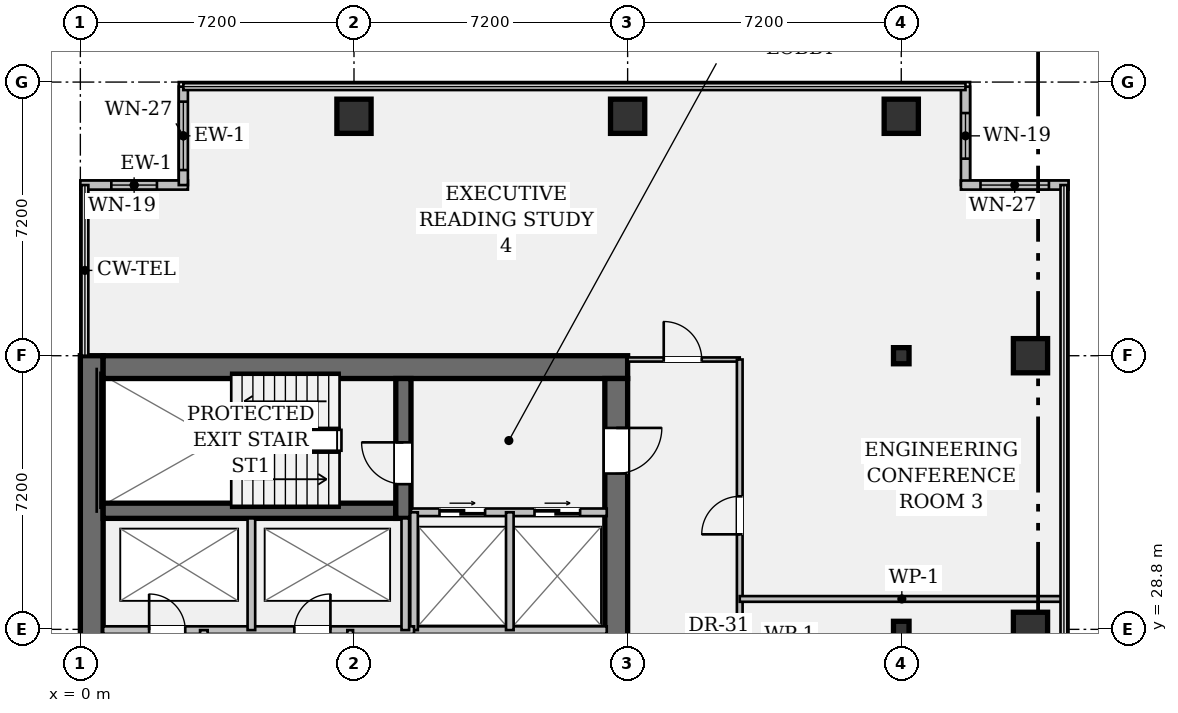
"""IFC4 building model, lengths in metres.
Left out: names, types, materials, properties, quantities, classifications, styles, units other than length and angle.
Written with IfcOpenShell. Run it as: python <this file> out.ifc"""

import sys

from ifc_helpers import new_model, si_unit, direction, frame, frame_2d, origin, origin_2d, place, context, subcontext, project, spatial, rectangle, hollow_rectangle, i_section, extrude, element, fill, save


model = new_model("IFC4")
c1 = context("Model", 3, precision=1e-05, world=origin(), true_north=direction((0.0, 1.0)))
c2 = subcontext(c1, "Body", "Model", "MODEL_VIEW")
j1 = project(units=[si_unit("LENGTHUNIT", "METRE"), si_unit("PLANEANGLEUNIT", "RADIAN")], contexts=[c1])
p1 = place(None, origin())
s1 = spatial("IfcSite", under=j1, at=p1, CompositionType="ELEMENT")
p2 = place(p1, origin())
s2 = spatial("IfcBuilding", under=s1, at=p2, CompositionType="ELEMENT")
p3 = place(p2, frame((0.0, 0.0, 144.55)))
s3 = spatial("IfcBuildingStorey", under=s2, at=p3, CompositionType="ELEMENT", Elevation=144.55)
p4 = place(p3, frame((0.3, 7.2, 0.0), z_axis=(0.0, 0.0, 1.0), x_axis=(0.0, 1.0, 0.0)))
e1 = element("IfcWall", 1, at=p4, inside=s3, PredefinedType="SHEAR", context=c2, shape_type="SweptSolid", body=[
    extrude(rectangle(XDim=28.8, YDim=0.6, at=frame_2d((14.4, 0.0))), origin(), (0.0, 0.0, 1.0), 3.58),
])
p5 = place(p3, frame((0.6, 35.7, 0.0), z_axis=(0.0, 0.0, 1.0), x_axis=(1.0, 0.0, 0.0)))
e2 = element("IfcWall", 2, at=p5, inside=s3, PredefinedType="SHEAR", context=c2, shape_type="SweptSolid", body=[
    extrude(rectangle(XDim=13.8, YDim=0.6, at=frame_2d((6.9, 0.0))), origin(), (0.0, 0.0, 1.0), 3.58),
])
p6 = place(p3, frame((14.1, 35.4, 0.0), z_axis=(0.0, 0.0, 1.0), x_axis=(0.0, -1.0, 0.0)))
e3 = element("IfcWall", 3, at=p6, inside=s3, PredefinedType="SHEAR", context=c2, shape_type="SweptSolid", body=[
    extrude(rectangle(XDim=27.6, YDim=0.6, at=frame_2d((13.8, 0.0))), origin(), (0.0, 0.0, 1.0), 3.58),
])
p7 = place(p6, frame((1.3, 0.0, 0.0)))
e4 = element("IfcOpeningElement", 4, at=p7, cuts=e3, PredefinedType="OPENING", context=c2, shape_type="SweptSolid", body=[
    extrude(rectangle(XDim=1.2, YDim=2.15, at=frame_2d((0.6, 1.075))), frame((0.0, 0.312, 0.0), z_axis=(0.0, -1.0, 0.0), x_axis=(1.0, 0.0, 0.0)), (0.0, 0.0, 1.0), 0.624),
])
p8 = place(p6, frame((25.25, 0.0, 0.0)))
e5 = element("IfcOpeningElement", 5, at=p8, cuts=e3, PredefinedType="OPENING", context=c2, shape_type="SweptSolid", body=[
    extrude(rectangle(XDim=1.2, YDim=2.15, at=frame_2d((0.6, 1.075))), frame((0.0, 0.312, 0.0), z_axis=(0.0, -1.0, 0.0), x_axis=(1.0, 0.0, 0.0)), (0.0, 0.0, 1.0), 0.624),
])
p9 = place(p6, frame((14.6, 0.0, 0.0)))
e6 = element("IfcOpeningElement", 6, at=p9, cuts=e3, PredefinedType="OPENING", context=c2, shape_type="SweptSolid", body=[
    extrude(rectangle(XDim=1.6, YDim=2.2, at=frame_2d((0.8, 1.1))), frame((0.0, 0.312, 0.0), z_axis=(0.0, -1.0, 0.0), x_axis=(1.0, 0.0, 0.0)), (0.0, 0.0, 1.0), 0.624),
])
p10 = place(p3, frame((0.6, 31.92, 0.0), z_axis=(0.0, 0.0, 1.0), x_axis=(1.0, 0.0, 0.0)))
e7 = element("IfcWall", 7, at=p10, inside=s3, PredefinedType="SHEAR", context=c2, shape_type="SweptSolid", body=[
    extrude(rectangle(XDim=7.7, YDim=0.4, at=frame_2d((3.85, 0.0))), origin(), (0.0, 0.0, 1.0), 3.58),
])
p11 = place(p3, frame((8.5, 31.72, 0.0), z_axis=(0.0, 0.0, 1.0), x_axis=(0.0, 1.0, 0.0)))
e8 = element("IfcWall", 8, at=p11, inside=s3, PredefinedType="SHEAR", context=c2, shape_type="SweptSolid", body=[
    extrude(rectangle(XDim=3.68, YDim=0.4, at=frame_2d((1.84, 0.0))), origin(), (0.0, 0.0, 1.0), 3.58),
])
p12 = place(p11, frame((0.9, 0.0, 0.0)))
e9 = element("IfcOpeningElement", 9, at=p12, cuts=e8, PredefinedType="OPENING", context=c2, shape_type="SweptSolid", body=[
    extrude(rectangle(XDim=1.1, YDim=2.15, at=frame_2d((0.55, 1.075))), frame((0.0, 0.212, 0.0), z_axis=(0.0, -1.0, 0.0), x_axis=(1.0, 0.0, 0.0)), (0.0, 0.0, 1.0), 0.424),
])
for number, where, z_axis, x_axis in (
    (10, (7.2, 42.3, 0.0), (0.0, 0.0, 1.0), (1.0, 0.0, 0.0)),
    (11, (14.4, 42.3, 0.0), (0.0, 0.0, 1.0), (1.0, 0.0, 0.0)),
):
    element("IfcColumn", number, at=place(p3, frame(where, z_axis=z_axis, x_axis=x_axis)), inside=s3, PredefinedType="COLUMN", context=c2, shape_type="SweptSolid", body=[
        extrude(hollow_rectangle(XDim=0.9, YDim=0.9, WallThickness=0.055, at=origin_2d()), origin(), (0.0, 0.0, 1.0), 3.58),
    ])
for number, where, z_axis, x_axis in (
    (12, (21.6, 28.8, 0.0), (0.0, 0.0, 1.0), (1.0, 0.0, 0.0)),
    (13, (21.6, 36.0, 0.0), (0.0, 0.0, 1.0), (1.0, 0.0, 0.0)),
):
    element("IfcColumn", number, at=place(p3, frame(where, z_axis=z_axis, x_axis=x_axis)), inside=s3, PredefinedType="COLUMN", context=c2, shape_type="SweptSolid", body=[
        extrude(i_section(OverallWidth=0.409, OverallDepth=0.424, WebThickness=0.033, FlangeThickness=0.052, FilletRadius=0.018, at=origin_2d()), origin(), (0.0, 0.0, 1.0), 3.58),
    ])
for number, where, z_axis, x_axis in (
    (14, (21.6, 42.3, 0.0), (0.0, 0.0, 1.0), (1.0, 0.0, 0.0)),
    (15, (25.0, 28.8, 0.0), (0.0, 0.0, 1.0), (1.0, 0.0, 0.0)),
    (16, (25.0, 36.0, 0.0), (0.0, 0.0, 1.0), (1.0, 0.0, 0.0)),
):
    element("IfcColumn", number, at=place(p3, frame(where, z_axis=z_axis, x_axis=x_axis)), inside=s3, PredefinedType="COLUMN", context=c2, shape_type="SweptSolid", body=[
        extrude(hollow_rectangle(XDim=0.9, YDim=0.9, WallThickness=0.055, at=origin_2d()), origin(), (0.0, 0.0, 1.0), 3.58),
    ])
p13 = place(p3, frame((0.0, 40.49, 0.0), z_axis=(0.0, 0.0, 1.0), x_axis=(1.0, 0.0, 0.0)))
e17 = element("IfcWall", 17, at=p13, inside=s3, PredefinedType="STANDARD", context=c2, shape_type="SweptSolid", body=[
    extrude(rectangle(XDim=2.83, YDim=0.24, at=frame_2d((1.415, 0.0))), origin(), (0.0, 0.0, 1.0), 3.58),
])
p14 = place(p13, frame((0.815, 0.0, 0.95)))
e18 = element("IfcOpeningElement", 18, at=p14, cuts=e17, PredefinedType="OPENING", context=c2, shape_type="SweptSolid", body=[
    extrude(rectangle(XDim=1.2, YDim=1.8, at=frame_2d((0.6, 0.9))), frame((0.0, 0.132, 0.0), z_axis=(0.0, -1.0, 0.0), x_axis=(1.0, 0.0, 0.0)), (0.0, 0.0, 1.0), 0.264),
])
p15 = place(p3, frame((2.71, 40.49, 0.0), z_axis=(0.0, 0.0, 1.0), x_axis=(0.0, 1.0, 0.0)))
e19 = element("IfcWall", 19, at=p15, inside=s3, PredefinedType="STANDARD", context=c2, shape_type="SweptSolid", body=[
    extrude(rectangle(XDim=2.59, YDim=0.24, at=frame_2d((1.295, 0.0))), origin(), (0.0, 0.0, 1.0), 3.58),
])
p16 = place(p15, frame((0.395, 0.0, 0.95)))
e20 = element("IfcOpeningElement", 20, at=p16, cuts=e19, PredefinedType="OPENING", context=c2, shape_type="SweptSolid", body=[
    extrude(rectangle(XDim=1.8, YDim=1.35, at=frame_2d((0.9, 0.675))), frame((0.0, 0.132, 0.0), z_axis=(0.0, -1.0, 0.0), x_axis=(1.0, 0.0, 0.0)), (0.0, 0.0, 1.0), 0.264),
])
p17 = place(p3, frame((23.29, 43.08, 0.0), z_axis=(0.0, 0.0, 1.0), x_axis=(0.0, -1.0, 0.0)))
e21 = element("IfcWall", 21, at=p17, inside=s3, PredefinedType="STANDARD", context=c2, shape_type="SweptSolid", body=[
    extrude(rectangle(XDim=2.59, YDim=0.24, at=frame_2d((1.295, 0.0))), origin(), (0.0, 0.0, 1.0), 3.58),
])
p18 = place(p17, frame((0.695, 0.0, 0.95)))
e22 = element("IfcOpeningElement", 22, at=p18, cuts=e21, PredefinedType="OPENING", context=c2, shape_type="SweptSolid", body=[
    extrude(rectangle(XDim=1.2, YDim=1.8, at=frame_2d((0.6, 0.9))), frame((0.0, 0.132, 0.0), z_axis=(0.0, -1.0, 0.0), x_axis=(1.0, 0.0, 0.0)), (0.0, 0.0, 1.0), 0.264),
])
p19 = place(p3, frame((23.17, 40.49, 0.0), z_axis=(0.0, 0.0, 1.0), x_axis=(1.0, 0.0, 0.0)))
e23 = element("IfcWall", 23, at=p19, inside=s3, PredefinedType="STANDARD", context=c2, shape_type="SweptSolid", body=[
    extrude(rectangle(XDim=2.83, YDim=0.24, at=frame_2d((1.415, 0.0))), origin(), (0.0, 0.0, 1.0), 3.58),
])
p20 = place(p19, frame((0.515, 0.0, 0.95)))
e24 = element("IfcOpeningElement", 24, at=p20, cuts=e23, PredefinedType="OPENING", context=c2, shape_type="SweptSolid", body=[
    extrude(rectangle(XDim=1.8, YDim=1.35, at=frame_2d((0.9, 0.675))), frame((0.0, 0.132, 0.0), z_axis=(0.0, -1.0, 0.0), x_axis=(1.0, 0.0, 0.0)), (0.0, 0.0, 1.0), 0.264),
])
p21 = place(p3, frame((8.7, 31.88, 0.0), z_axis=(0.0, 0.0, 1.0), x_axis=(1.0, 0.0, 0.0)))
e25 = element("IfcWall", 25, at=p21, inside=s3, PredefinedType="PARTITIONING", context=c2, shape_type="SweptSolid", body=[
    extrude(rectangle(XDim=5.15, YDim=0.2, at=frame_2d((2.575, 0.0))), origin(), (0.0, 0.0, 1.0), 3.58),
])
p22 = place(p21, frame((0.75, 0.0, 0.0)))
e26 = element("IfcOpeningElement", 26, at=p22, cuts=e25, PredefinedType="OPENING", context=c2, shape_type="SweptSolid", body=[
    extrude(rectangle(XDim=1.2, YDim=2.2, at=frame_2d((0.6, 1.1))), frame((0.0, 0.112, 0.0), z_axis=(0.0, -1.0, 0.0), x_axis=(1.0, 0.0, 0.0)), (0.0, 0.0, 1.0), 0.224),
])
p23 = place(p21, frame((3.25, 0.0, 0.0)))
e27 = element("IfcOpeningElement", 27, at=p23, cuts=e25, PredefinedType="OPENING", context=c2, shape_type="SweptSolid", body=[
    extrude(rectangle(XDim=1.2, YDim=2.2, at=frame_2d((0.6, 1.1))), frame((0.0, 0.112, 0.0), z_axis=(0.0, -1.0, 0.0), x_axis=(1.0, 0.0, 0.0)), (0.0, 0.0, 1.0), 0.224),
])
p24 = place(p3, frame((8.7, 28.78, 0.0), z_axis=(0.0, 0.0, 1.0), x_axis=(1.0, 0.0, 0.0)))
e28 = element("IfcWall", 28, at=p24, inside=s3, PredefinedType="PARTITIONING", context=c2, shape_type="SweptSolid", body=[
    extrude(rectangle(XDim=5.15, YDim=0.2, at=frame_2d((2.575, 0.0))), origin(), (0.0, 0.0, 1.0), 3.58),
])
for number, where, z_axis, x_axis in (
    (29, (8.78, 28.78, 0.0), (0.0, 0.0, 1.0), (0.0, 1.0, 0.0)),
    (30, (11.3, 28.78, 0.0), (0.0, 0.0, 1.0), (0.0, 1.0, 0.0)),
):
    element("IfcWall", number, at=place(p3, frame(where, z_axis=z_axis, x_axis=x_axis)), inside=s3, PredefinedType="PARTITIONING", context=c2, shape_type="SweptSolid", body=[
        extrude(rectangle(XDim=3.1, YDim=0.2, at=frame_2d((1.55, 0.0))), origin(), (0.0, 0.0, 1.0), 3.58),
    ])
p25 = place(p3, frame((0.6, 28.78, 0.0), z_axis=(0.0, 0.0, 1.0), x_axis=(1.0, 0.0, 0.0)))
e31 = element("IfcWall", 31, at=p25, inside=s3, PredefinedType="PARTITIONING", context=c2, shape_type="SweptSolid", body=[
    extrude(rectangle(XDim=8.18, YDim=0.2, at=frame_2d((4.09, 0.0))), origin(), (0.0, 0.0, 1.0), 3.58),
])
p26 = place(p25, frame((1.21, 0.0, 0.0)))
e32 = element("IfcOpeningElement", 32, at=p26, cuts=e31, PredefinedType="OPENING", context=c2, shape_type="SweptSolid", body=[
    extrude(rectangle(XDim=0.95, YDim=2.15, at=frame_2d((0.475, 1.075))), frame((0.0, 0.112, 0.0), z_axis=(0.0, -1.0, 0.0), x_axis=(1.0, 0.0, 0.0)), (0.0, 0.0, 1.0), 0.224),
])
p27 = place(p25, frame((5.03, 0.0, 0.0)))
e33 = element("IfcOpeningElement", 33, at=p27, cuts=e31, PredefinedType="OPENING", context=c2, shape_type="SweptSolid", body=[
    extrude(rectangle(XDim=0.95, YDim=2.15, at=frame_2d((0.475, 1.075))), frame((0.0, 0.112, 0.0), z_axis=(0.0, -1.0, 0.0), x_axis=(1.0, 0.0, 0.0)), (0.0, 0.0, 1.0), 0.224),
])
for number, where, z_axis, x_axis in (
    (34, (4.5, 28.78, 0.0), (0.0, 0.0, 1.0), (0.0, 1.0, 0.0)),
    (35, (8.55, 28.78, 0.0), (0.0, 0.0, 1.0), (0.0, 1.0, 0.0)),
):
    element("IfcWall", number, at=place(p3, frame(where, z_axis=z_axis, x_axis=x_axis)), inside=s3, PredefinedType="PARTITIONING", context=c2, shape_type="SweptSolid", body=[
        extrude(rectangle(XDim=2.94, YDim=0.2, at=frame_2d((1.47, 0.0))), origin(), (0.0, 0.0, 1.0), 3.58),
    ])
p28 = place(p3, frame((3.25, 15.7, 0.0), z_axis=(0.0, 0.0, 1.0), x_axis=(0.0, 1.0, 0.0)))
e36 = element("IfcWall", 36, at=p28, inside=s3, PredefinedType="PARTITIONING", context=c2, shape_type="SweptSolid", body=[
    extrude(rectangle(XDim=13.08, YDim=0.2, at=frame_2d((6.54, 0.0))), origin(), (0.0, 0.0, 1.0), 3.58),
])
p29 = place(p3, frame((7.1, 22.2, 0.0), z_axis=(0.0, 0.0, 1.0), x_axis=(0.0, 1.0, 0.0)))
e37 = element("IfcWall", 37, at=p29, inside=s3, PredefinedType="PARTITIONING", context=c2, shape_type="SweptSolid", body=[
    extrude(rectangle(XDim=6.58, YDim=0.15, at=frame_2d((3.29, 0.0))), origin(), (0.0, 0.0, 1.0), 3.58),
])
p30 = place(p3, frame((14.4, 35.9, 0.0), z_axis=(0.0, 0.0, 1.0), x_axis=(1.0, 0.0, 0.0)))
e38 = element("IfcWall", 38, at=p30, inside=s3, PredefinedType="PARTITIONING", context=c2, shape_type="SweptSolid", body=[
    extrude(rectangle(XDim=2.95, YDim=0.11, at=frame_2d((1.475, 0.0))), origin(), (0.0, 0.0, 1.0), 2.869),
])
p31 = place(p30, frame((0.95, 0.0, 0.0)))
e39 = element("IfcOpeningElement", 39, at=p31, cuts=e38, PredefinedType="OPENING", context=c2, shape_type="SweptSolid", body=[
    extrude(rectangle(XDim=1.0, YDim=2.15, at=frame_2d((0.5, 1.075))), frame((0.0, 0.067, 0.0), z_axis=(0.0, -1.0, 0.0), x_axis=(1.0, 0.0, 0.0)), (0.0, 0.0, 1.0), 0.134),
])
p32 = place(p3, frame((17.35, 20.7, 0.0), z_axis=(0.0, 0.0, 1.0), x_axis=(0.0, 1.0, 0.0)))
e40 = element("IfcWall", 40, at=p32, inside=s3, PredefinedType="PARTITIONING", context=c2, shape_type="SweptSolid", body=[
    extrude(rectangle(XDim=15.2, YDim=0.15, at=frame_2d((7.6, 0.0))), origin(), (0.0, 0.0, 1.0), 2.869),
])
p33 = place(p32, frame((5.2, 0.0, 0.0)))
e41 = element("IfcOpeningElement", 41, at=p33, cuts=e40, PredefinedType="OPENING", context=c2, shape_type="SweptSolid", body=[
    extrude(rectangle(XDim=0.98, YDim=2.15, at=frame_2d((0.49, 1.075))), frame((0.0, 0.087, 0.0), z_axis=(0.0, -1.0, 0.0), x_axis=(1.0, 0.0, 0.0)), (0.0, 0.0, 1.0), 0.174),
])
p34 = place(p32, frame((10.6, 0.0, 0.0)))
e42 = element("IfcOpeningElement", 42, at=p34, cuts=e40, PredefinedType="OPENING", context=c2, shape_type="SweptSolid", body=[
    extrude(rectangle(XDim=1.0, YDim=2.15, at=frame_2d((0.5, 1.075))), frame((0.0, 0.087, 0.0), z_axis=(0.0, -1.0, 0.0), x_axis=(1.0, 0.0, 0.0)), (0.0, 0.0, 1.0), 0.174),
])
p35 = place(p3, frame((17.35, 29.6, 0.0), z_axis=(0.0, 0.0, 1.0), x_axis=(1.0, 0.0, 0.0)))
e43 = element("IfcWall", 43, at=p35, inside=s3, PredefinedType="PARTITIONING", context=c2, shape_type="SweptSolid", body=[
    extrude(rectangle(XDim=8.53, YDim=0.15, at=frame_2d((4.265, 0.0))), origin(), (0.0, 0.0, 1.0), 2.869),
])
p36 = place(p14, origin())
e44 = element("IfcWindow", 44, at=p36, inside=s3, PartitioningType="SINGLE_PANEL", PredefinedType="WINDOW", context=c2, shape_type="SweptSolid", body=[
    extrude(rectangle(XDim=1.2, YDim=1.8, at=frame_2d((0.6, 0.9))), frame((0.0, 0.03, 0.0), z_axis=(0.0, -1.0, 0.0), x_axis=(1.0, 0.0, 0.0)), (0.0, 0.0, 1.0), 0.06),
])
fill(e18, e44)
p37 = place(p16, origin())
e45 = element("IfcWindow", 45, at=p37, inside=s3, PartitioningType="SINGLE_PANEL", PredefinedType="WINDOW", context=c2, shape_type="SweptSolid", body=[
    extrude(rectangle(XDim=1.8, YDim=1.35, at=frame_2d((0.9, 0.675))), frame((0.0, 0.03, 0.0), z_axis=(0.0, -1.0, 0.0), x_axis=(1.0, 0.0, 0.0)), (0.0, 0.0, 1.0), 0.06),
])
fill(e20, e45)
p38 = place(p18, origin())
e46 = element("IfcWindow", 46, at=p38, inside=s3, PartitioningType="SINGLE_PANEL", PredefinedType="WINDOW", context=c2, shape_type="SweptSolid", body=[
    extrude(rectangle(XDim=1.2, YDim=1.8, at=frame_2d((0.6, 0.9))), frame((0.0, 0.03, 0.0), z_axis=(0.0, -1.0, 0.0), x_axis=(1.0, 0.0, 0.0)), (0.0, 0.0, 1.0), 0.06),
])
fill(e22, e46)
p39 = place(p20, origin())
e47 = element("IfcWindow", 47, at=p39, inside=s3, PartitioningType="SINGLE_PANEL", PredefinedType="WINDOW", context=c2, shape_type="SweptSolid", body=[
    extrude(rectangle(XDim=1.8, YDim=1.35, at=frame_2d((0.9, 0.675))), frame((0.0, 0.03, 0.0), z_axis=(0.0, -1.0, 0.0), x_axis=(1.0, 0.0, 0.0)), (0.0, 0.0, 1.0), 0.06),
])
fill(e24, e47)
p40 = place(p12, origin())
e48 = element("IfcDoor", 48, at=p40, inside=s3, OperationType="SINGLE_SWING_RIGHT", PredefinedType="DOOR", context=c2, shape_type="SweptSolid", body=[
    extrude(rectangle(XDim=1.1, YDim=2.15, at=frame_2d((0.55, 1.075))), frame((0.0, 0.025, 0.0), z_axis=(0.0, -1.0, 0.0), x_axis=(1.0, 0.0, 0.0)), (0.0, 0.0, 1.0), 0.05),
])
fill(e9, e48)
p41 = place(p7, origin())
e49 = element("IfcDoor", 49, at=p41, inside=s3, OperationType="SINGLE_SWING_LEFT", PredefinedType="DOOR", context=c2, shape_type="SweptSolid", body=[
    extrude(rectangle(XDim=1.2, YDim=2.15, at=frame_2d((0.6, 1.075))), frame((0.0, 0.025, 0.0), z_axis=(0.0, -1.0, 0.0), x_axis=(1.0, 0.0, 0.0)), (0.0, 0.0, 1.0), 0.05),
])
fill(e4, e49)
p42 = place(p22, origin())
e50 = element("IfcDoor", 50, at=p42, inside=s3, OperationType="DOUBLE_DOOR_SLIDING", PredefinedType="DOOR", context=c2, shape_type="SweptSolid", body=[
    extrude(rectangle(XDim=1.2, YDim=2.2, at=frame_2d((0.6, 1.1))), frame((0.0, 0.025, 0.0), z_axis=(0.0, -1.0, 0.0), x_axis=(1.0, 0.0, 0.0)), (0.0, 0.0, 1.0), 0.05),
])
fill(e26, e50)
p43 = place(p23, origin())
e51 = element("IfcDoor", 51, at=p43, inside=s3, OperationType="DOUBLE_DOOR_SLIDING", PredefinedType="DOOR", context=c2, shape_type="SweptSolid", body=[
    extrude(rectangle(XDim=1.2, YDim=2.2, at=frame_2d((0.6, 1.1))), frame((0.0, 0.025, 0.0), z_axis=(0.0, -1.0, 0.0), x_axis=(1.0, 0.0, 0.0)), (0.0, 0.0, 1.0), 0.05),
])
fill(e27, e51)
p44 = place(p26, origin())
e52 = element("IfcDoor", 52, at=p44, inside=s3, OperationType="SINGLE_SWING_LEFT", PredefinedType="DOOR", context=c2, shape_type="SweptSolid", body=[
    extrude(rectangle(XDim=0.95, YDim=2.15, at=frame_2d((0.475, 1.075))), frame((0.0, 0.025, 0.0), z_axis=(0.0, -1.0, 0.0), x_axis=(1.0, 0.0, 0.0)), (0.0, 0.0, 1.0), 0.05),
])
fill(e32, e52)
p45 = place(p27, origin())
e53 = element("IfcDoor", 53, at=p45, inside=s3, OperationType="SINGLE_SWING_RIGHT", PredefinedType="DOOR", context=c2, shape_type="SweptSolid", body=[
    extrude(rectangle(XDim=0.95, YDim=2.15, at=frame_2d((0.475, 1.075))), frame((0.0, 0.025, 0.0), z_axis=(0.0, -1.0, 0.0), x_axis=(1.0, 0.0, 0.0)), (0.0, 0.0, 1.0), 0.05),
])
fill(e33, e53)
p46 = place(p34, origin())
e54 = element("IfcDoor", 54, at=p46, inside=s3, OperationType="SINGLE_SWING_LEFT", PredefinedType="DOOR", context=c2, shape_type="SweptSolid", body=[
    extrude(rectangle(XDim=1.0, YDim=2.15, at=frame_2d((0.5, 1.075))), frame((0.0, 0.025, 0.0), z_axis=(0.0, -1.0, 0.0), x_axis=(1.0, 0.0, 0.0)), (0.0, 0.0, 1.0), 0.05),
])
fill(e42, e54)
p47 = place(p31, origin())
e55 = element("IfcDoor", 55, at=p47, inside=s3, OperationType="SINGLE_SWING_LEFT", PredefinedType="DOOR", context=c2, shape_type="SweptSolid", body=[
    extrude(rectangle(XDim=1.0, YDim=2.15, at=frame_2d((0.5, 1.075))), frame((0.0, 0.025, 0.0), z_axis=(0.0, -1.0, 0.0), x_axis=(1.0, 0.0, 0.0)), (0.0, 0.0, 1.0), 0.05),
])
fill(e39, e55)
save(model, sys.argv[1])
